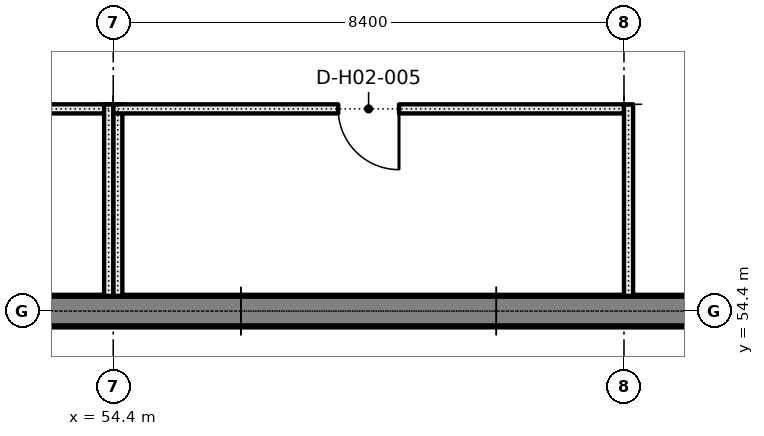
"""IFC4 building model, lengths in metres.
Left out: names, types, materials, properties, quantities, classifications, styles, units other than length and angle.
Written with IfcOpenShell. Run it as: python <this file> out.ifc"""

import sys

from ifc_helpers import new_model, si_unit, direction, frame, frame_2d, origin, place, context, subcontext, project, spatial, rectangle, extrude, element, fill, save


model = new_model("IFC4")
c1 = context("Model", 3, precision=1e-05, world=origin(), true_north=direction((0.0, 1.0)))
c2 = subcontext(c1, "Body", "Model", "MODEL_VIEW")
j1 = project(units=[si_unit("LENGTHUNIT", "METRE"), si_unit("PLANEANGLEUNIT", "RADIAN")], contexts=[c1])
p1 = place(None, origin())
s1 = spatial("IfcSite", under=j1, at=p1, CompositionType="ELEMENT")
p2 = place(p1, origin())
s2 = spatial("IfcBuilding", under=s1, at=p2, CompositionType="ELEMENT")
p3 = place(p2, frame((0.0, 0.0, 10.2)))
s3 = spatial("IfcBuildingStorey", under=s2, at=p3, CompositionType="ELEMENT", Elevation=10.2)
for number, where, z_axis, x_axis in (
    (1, (52.3, 54.4, 0.0), (0.0, 0.0, 1.0), (1.0, 0.0, 0.0)),
    (2, (60.7, 54.4, 0.0), (0.0, 0.0, 1.0), (1.0, 0.0, 0.0)),
):
    element("IfcWall", number, at=place(p3, frame(where, z_axis=z_axis, x_axis=x_axis)), inside=s3, PredefinedType="SOLIDWALL", context=c2, shape_type="SweptSolid", body=[
        extrude(rectangle(XDim=4.2, YDim=0.5, at=frame_2d((2.1, 0.0))), origin(), (0.0, 0.0, 1.0), 3.5),
    ])
p4 = place(p3, frame((56.5, 54.4, 0.0), z_axis=(0.0, 0.0, 1.0), x_axis=(1.0, 0.0, 0.0)))
e3 = element("IfcWall", 3, at=p4, inside=s3, PredefinedType="SOLIDWALL", context=c2, shape_type="SweptSolid", body=[
    extrude(rectangle(XDim=4.2, YDim=0.5, at=frame_2d((2.1, 0.0))), origin(), (0.0, 0.0, 1.0), 0.9),
])
p5 = place(p3, frame((29.45, 54.4, 3.5), z_axis=(0.0, 0.0, 1.0), x_axis=(1.0, 0.0, 0.0)))
e4 = element("IfcWall", 4, at=p5, inside=s3, PredefinedType="SOLIDWALL", context=c2, shape_type="SweptSolid", body=[
    extrude(rectangle(XDim=66.7, YDim=0.5, at=frame_2d((33.35, 0.0))), origin(), (0.0, 0.0, 1.0), 1.3),
])
p6 = place(p3, frame((46.0, 57.725, 0.0), z_axis=(0.0, 0.0, 1.0), x_axis=(1.0, 0.0, 0.0)))
e5 = element("IfcWall", 5, at=p6, inside=s3, PredefinedType="PARTITIONING", context=c2, shape_type="SweptSolid", body=[
    extrude(rectangle(XDim=8.4, YDim=0.15, at=frame_2d((4.2, 0.0))), origin(), (0.0, 0.0, 1.0), 4.55),
])
p7 = place(p6, frame((3.7, 0.0, 0.0)))
e6 = element("IfcOpeningElement", 6, at=p7, cuts=e5, PredefinedType="OPENING", context=c2, shape_type="SweptSolid", body=[
    extrude(rectangle(XDim=1.0, YDim=2.1, at=frame_2d((0.5, 1.05))), frame((0.0, 0.085, 0.0), z_axis=(0.0, -1.0, 0.0), x_axis=(1.0, 0.0, 0.0)), (0.0, 0.0, 1.0), 0.17),
])
p8 = place(p3, frame((54.475, 54.65, 0.0), z_axis=(0.0, 0.0, 1.0), x_axis=(0.0, 1.0, 0.0)))
e7 = element("IfcWall", 7, at=p8, inside=s3, PredefinedType="PARTITIONING", context=c2, shape_type="SweptSolid", body=[
    extrude(rectangle(XDim=3.15, YDim=0.15, at=frame_2d((1.575, 0.0))), origin(), (0.0, 0.0, 1.0), 4.55),
])
p9 = place(p3, frame((54.4, 57.725, 0.0), z_axis=(0.0, 0.0, 1.0), x_axis=(1.0, 0.0, 0.0)))
e8 = element("IfcWall", 8, at=p9, inside=s3, PredefinedType="PARTITIONING", context=c2, shape_type="SweptSolid", body=[
    extrude(rectangle(XDim=8.4, YDim=0.15, at=frame_2d((4.2, 0.0))), origin(), (0.0, 0.0, 1.0), 4.55),
])
p10 = place(p9, frame((3.7, 0.0, 0.0)))
e9 = element("IfcOpeningElement", 9, at=p10, cuts=e8, PredefinedType="OPENING", context=c2, shape_type="SweptSolid", body=[
    extrude(rectangle(XDim=1.0, YDim=2.1, at=frame_2d((0.5, 1.05))), frame((0.0, 0.085, 0.0), z_axis=(0.0, -1.0, 0.0), x_axis=(1.0, 0.0, 0.0)), (0.0, 0.0, 1.0), 0.17),
])
for number, where, z_axis, x_axis in (
    (10, (54.325, 54.65, 0.0), (0.0, 0.0, 1.0), (0.0, 1.0, 0.0)),
    (11, (62.875, 54.65, 0.0), (0.0, 0.0, 1.0), (0.0, 1.0, 0.0)),
):
    element("IfcWall", number, at=place(p3, frame(where, z_axis=z_axis, x_axis=x_axis)), inside=s3, PredefinedType="PARTITIONING", context=c2, shape_type="SweptSolid", body=[
        extrude(rectangle(XDim=3.15, YDim=0.15, at=frame_2d((1.575, 0.0))), origin(), (0.0, 0.0, 1.0), 4.55),
    ])
p11 = place(p10, frame((1.0, 0.0, 0.0), z_axis=(0.0, 0.0, 1.0), x_axis=(-1.0, 0.0, 0.0)))
e12 = element("IfcDoor", 12, at=p11, inside=s3, OperationType="SINGLE_SWING_LEFT", PredefinedType="DOOR", context=c2, shape_type="SweptSolid", body=[
    extrude(rectangle(XDim=1.0, YDim=2.1, at=frame_2d((0.5, 1.05))), frame((0.0, 0.025, 0.0), z_axis=(0.0, -1.0, 0.0), x_axis=(1.0, 0.0, 0.0)), (0.0, 0.0, 1.0), 0.05),
])
fill(e9, e12)
save(model, sys.argv[1])
